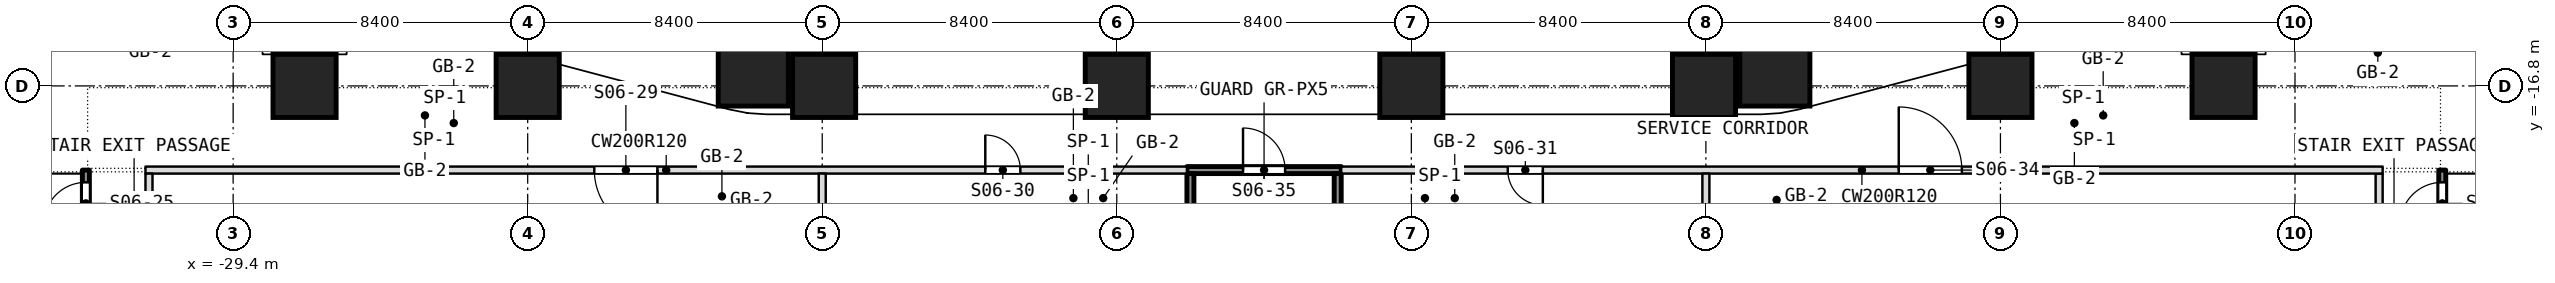
"""IFC4 building model, lengths in metres.
Left out: names, types, materials, properties, quantities, classifications, styles, units other than length and angle.
Written with IfcOpenShell. Run it as: python <this file> out.ifc"""

import sys

from ifc_helpers import new_model, si_unit, direction, frame, frame_2d, origin, origin_2d, place, context, subcontext, project, spatial, rectangle, extrude, element, fill, save


model = new_model("IFC4")
c1 = context("Model", 3, precision=1e-05, world=origin(), true_north=direction((0.0, 1.0)))
c2 = subcontext(c1, "Body", "Model", "MODEL_VIEW")
j1 = project(units=[si_unit("LENGTHUNIT", "METRE"), si_unit("PLANEANGLEUNIT", "RADIAN")], contexts=[c1])
p1 = place(None, origin())
s1 = spatial("IfcSite", under=j1, at=p1, CompositionType="ELEMENT")
p2 = place(p1, origin())
s2 = spatial("IfcBuilding", under=s1, at=p2, CompositionType="ELEMENT")
p3 = place(p2, frame((0.0, 0.0, 31.0)))
s3 = spatial("IfcBuildingStorey", under=s2, at=p3, CompositionType="ELEMENT", Elevation=31.0)
for number, where, z_axis, x_axis in (
    (1, (-21.0, -16.8, 0.0), (0.0, 0.0, 1.0), (1.0, 0.0, 0.0)),
    (2, (-12.546, -16.8, 0.0), (0.0, 0.0, 1.0), (1.0, 0.0, 0.0)),
    (3, (-4.2, -16.8, 0.0), (0.0, 0.0, 1.0), (1.0, 0.0, 0.0)),
    (4, (4.2, -16.8, 0.0), (0.0, 0.0, 1.0), (1.0, 0.0, 0.0)),
    (5, (12.546, -16.8, 0.0), (0.0, 0.0, 1.0), (1.0, 0.0, 0.0)),
    (6, (21.0, -16.8, 0.0), (0.0, 0.0, 1.0), (1.0, 0.0, 0.0)),
    (7, (-27.363, -16.8, 0.0), (0.0, 0.0, 1.0), (1.0, 0.0, 0.0)),
    (8, (27.363, -16.8, 0.0), (0.0, 0.0, 1.0), (1.0, 0.0, 0.0)),
):
    element("IfcColumn", number, at=place(p3, frame(where, z_axis=z_axis, x_axis=x_axis)), inside=s3, PredefinedType="COLUMN", context=c2, shape_type="SweptSolid", body=[
        extrude(rectangle(XDim=1.8, YDim=1.8, at=origin_2d()), origin(), (0.0, 0.0, 1.0), 5.5),
    ])
for number, where, z_axis, x_axis in (
    (9, (-14.566, -16.375, 0.0), (0.0, 0.0, 1.0), (1.0, 0.0, 0.0)),
    (10, (14.566, -16.375, 0.0), (0.0, 0.0, 1.0), (1.0, 0.0, 0.0)),
):
    element("IfcColumn", number, at=place(p3, frame(where, z_axis=z_axis, x_axis=x_axis)), inside=s3, PredefinedType="COLUMN", context=c2, shape_type="SweptSolid", body=[
        extrude(rectangle(XDim=2.0, YDim=2.0, at=origin_2d()), origin(), (0.0, 0.0, 1.0), 5.5),
    ])
p4 = place(p3, frame((33.6, -22.3, 0.0), z_axis=(0.0, 0.0, 1.0), x_axis=(0.0, 1.0, 0.0)))
e11 = element("IfcWall", 11, at=p4, inside=s3, PredefinedType="PARTITIONING", context=c2, shape_type="SweptSolid", body=[
    extrude(rectangle(XDim=3.1, YDim=0.2, at=frame_2d((1.55, 0.0))), origin(), (0.0, 0.0, 1.0), 5.35),
])
p5 = place(p4, frame((1.55, 0.0, 0.0)))
e12 = element("IfcOpeningElement", 12, at=p5, cuts=e11, PredefinedType="OPENING", context=c2, shape_type="SweptSolid", body=[
    extrude(rectangle(XDim=1.2, YDim=2.1, at=frame_2d((0.6, 1.05))), frame((0.0, 0.1, 0.0), z_axis=(0.0, -1.0, 0.0), x_axis=(1.0, 0.0, 0.0)), (0.0, 0.0, 1.0), 0.2),
])
p6 = place(p3, frame((31.8, -22.1, 0.0), z_axis=(0.0, 0.0, 1.0), x_axis=(0.0, 1.0, 0.0)))
e13 = element("IfcWall", 13, at=p6, inside=s3, PredefinedType="PARTITIONING", context=c2, shape_type="SweptSolid", body=[
    extrude(rectangle(XDim=2.8, YDim=0.2, at=frame_2d((1.4, 0.0))), origin(), (0.0, 0.0, 1.0), 5.35),
])
p7 = place(p3, frame((-31.9, -19.2, 0.0), z_axis=(0.0, 0.0, 1.0), x_axis=(1.0, 0.0, 0.0)))
e14 = element("IfcWall", 14, at=p7, inside=s3, PredefinedType="PARTITIONING", context=c2, shape_type="SweptSolid", body=[
    extrude(rectangle(XDim=29.7, YDim=0.2, at=frame_2d((14.85, 0.0))), origin(), (0.0, 0.0, 1.0), 3.7),
])
p8 = place(p7, frame((12.8, 0.0, 0.0)))
e15 = element("IfcOpeningElement", 15, at=p8, cuts=e14, PredefinedType="OPENING", context=c2, shape_type="SweptSolid", body=[
    extrude(rectangle(XDim=1.8, YDim=2.1, at=frame_2d((0.9, 1.05))), frame((0.0, 0.1, 0.0), z_axis=(0.0, -1.0, 0.0), x_axis=(1.0, 0.0, 0.0)), (0.0, 0.0, 1.0), 0.2),
])
p9 = place(p7, frame((23.95, 0.0, 0.0)))
e16 = element("IfcOpeningElement", 16, at=p9, cuts=e14, PredefinedType="OPENING", context=c2, shape_type="SweptSolid", body=[
    extrude(rectangle(XDim=1.0, YDim=2.1, at=frame_2d((0.5, 1.05))), frame((0.0, 0.1, 0.0), z_axis=(0.0, -1.0, 0.0), x_axis=(1.0, 0.0, 0.0)), (0.0, 0.0, 1.0), 0.2),
])
p10 = place(p3, frame((2.2, -19.2, 0.0), z_axis=(0.0, 0.0, 1.0), x_axis=(1.0, 0.0, 0.0)))
e17 = element("IfcWall", 17, at=p10, inside=s3, PredefinedType="PARTITIONING", context=c2, shape_type="SweptSolid", body=[
    extrude(rectangle(XDim=29.7, YDim=0.2, at=frame_2d((14.85, 0.0))), origin(), (0.0, 0.0, 1.0), 3.7),
])
p11 = place(p10, frame((4.75, 0.0, 0.0)))
e18 = element("IfcOpeningElement", 18, at=p11, cuts=e17, PredefinedType="OPENING", context=c2, shape_type="SweptSolid", body=[
    extrude(rectangle(XDim=1.0, YDim=2.1, at=frame_2d((0.5, 1.05))), frame((0.0, 0.1, 0.0), z_axis=(0.0, -1.0, 0.0), x_axis=(1.0, 0.0, 0.0)), (0.0, 0.0, 1.0), 0.2),
])
p12 = place(p10, frame((15.9, 0.0, 0.0)))
e19 = element("IfcOpeningElement", 19, at=p12, cuts=e17, PredefinedType="OPENING", context=c2, shape_type="SweptSolid", body=[
    extrude(rectangle(XDim=1.8, YDim=2.1, at=frame_2d((0.9, 1.05))), frame((0.0, 0.1, 0.0), z_axis=(0.0, -1.0, 0.0), x_axis=(1.0, 0.0, 0.0)), (0.0, 0.0, 1.0), 0.2),
])
p13 = place(p3, frame((-2.2, -19.2, 0.0), z_axis=(0.0, 0.0, 1.0), x_axis=(1.0, 0.0, 0.0)))
e20 = element("IfcWall", 20, at=p13, inside=s3, PredefinedType="PARTITIONING", context=c2, shape_type="SweptSolid", body=[
    extrude(rectangle(XDim=4.4, YDim=0.2, at=frame_2d((2.2, 0.0))), origin(), (0.0, 0.0, 1.0), 5.35),
])
p14 = place(p13, frame((1.6, 0.0, 0.0)))
e21 = element("IfcOpeningElement", 21, at=p14, cuts=e20, PredefinedType="OPENING", context=c2, shape_type="SweptSolid", body=[
    extrude(rectangle(XDim=1.2, YDim=2.1, at=frame_2d((0.6, 1.05))), frame((0.0, 0.1, 0.0), z_axis=(0.0, -1.0, 0.0), x_axis=(1.0, 0.0, 0.0)), (0.0, 0.0, 1.0), 0.2),
])
p15 = place(p3, frame((12.6, -25.5, 0.0), z_axis=(0.0, 0.0, 1.0), x_axis=(0.0, 1.0, 0.0)))
e22 = element("IfcWall", 22, at=p15, inside=s3, PredefinedType="PARTITIONING", context=c2, shape_type="SweptSolid", body=[
    extrude(rectangle(XDim=6.2, YDim=0.2, at=frame_2d((3.1, 0.0))), origin(), (0.0, 0.0, 1.0), 5.35),
])
for number, where, z_axis, x_axis in (
    (23, (2.1, -25.14, 0.0), (0.0, 0.0, 1.0), (0.0, 1.0, 0.0)),
    (24, (-2.1, -25.14, 0.0), (0.0, 0.0, 1.0), (0.0, 1.0, 0.0)),
):
    element("IfcWall", number, at=place(p3, frame(where, z_axis=z_axis, x_axis=x_axis)), inside=s3, PredefinedType="PARTITIONING", context=c2, shape_type="SweptSolid", body=[
        extrude(rectangle(XDim=5.84, YDim=0.2, at=frame_2d((2.92, 0.0))), origin(), (0.0, 0.0, 1.0), 5.35),
    ])
p16 = place(p3, frame((-12.6, -25.5, 0.0), z_axis=(0.0, 0.0, 1.0), x_axis=(0.0, 1.0, 0.0)))
e25 = element("IfcWall", 25, at=p16, inside=s3, PredefinedType="PARTITIONING", context=c2, shape_type="SweptSolid", body=[
    extrude(rectangle(XDim=6.2, YDim=0.2, at=frame_2d((3.1, 0.0))), origin(), (0.0, 0.0, 1.0), 5.35),
])
p17 = place(p3, frame((-31.8, -22.1, 0.0), z_axis=(0.0, 0.0, 1.0), x_axis=(0.0, 1.0, 0.0)))
e26 = element("IfcWall", 26, at=p17, inside=s3, PredefinedType="PARTITIONING", context=c2, shape_type="SweptSolid", body=[
    extrude(rectangle(XDim=2.8, YDim=0.2, at=frame_2d((1.4, 0.0))), origin(), (0.0, 0.0, 1.0), 5.35),
])
p18 = place(p3, frame((-33.6, -22.3, 0.0), z_axis=(0.0, 0.0, 1.0), x_axis=(0.0, 1.0, 0.0)))
e27 = element("IfcWall", 27, at=p18, inside=s3, PredefinedType="PARTITIONING", context=c2, shape_type="SweptSolid", body=[
    extrude(rectangle(XDim=3.1, YDim=0.2, at=frame_2d((1.55, 0.0))), origin(), (0.0, 0.0, 1.0), 5.35),
])
p19 = place(p18, frame((1.55, 0.0, 0.0)))
e28 = element("IfcOpeningElement", 28, at=p19, cuts=e27, PredefinedType="OPENING", context=c2, shape_type="SweptSolid", body=[
    extrude(rectangle(XDim=1.2, YDim=2.1, at=frame_2d((0.6, 1.05))), frame((0.0, 0.1, 0.0), z_axis=(0.0, -1.0, 0.0), x_axis=(1.0, 0.0, 0.0)), (0.0, 0.0, 1.0), 0.2),
])
p20 = place(p19, origin())
e29 = element("IfcDoor", 29, at=p20, inside=s3, OperationType="SINGLE_SWING_RIGHT", PredefinedType="DOOR", context=c2, shape_type="SweptSolid", body=[
    extrude(rectangle(XDim=1.2, YDim=2.1, at=frame_2d((0.6, 1.05))), frame((0.0, 0.025, 0.0), z_axis=(0.0, -1.0, 0.0), x_axis=(1.0, 0.0, 0.0)), (0.0, 0.0, 1.0), 0.05),
])
fill(e28, e29)
p21 = place(p5, origin())
e30 = element("IfcDoor", 30, at=p21, inside=s3, OperationType="SINGLE_SWING_LEFT", PredefinedType="DOOR", context=c2, shape_type="SweptSolid", body=[
    extrude(rectangle(XDim=1.2, YDim=2.1, at=frame_2d((0.6, 1.05))), frame((0.0, 0.025, 0.0), z_axis=(0.0, -1.0, 0.0), x_axis=(1.0, 0.0, 0.0)), (0.0, 0.0, 1.0), 0.05),
])
fill(e12, e30)
p22 = place(p8, origin())
e31 = element("IfcDoor", 31, at=p22, inside=s3, OperationType="DOUBLE_DOOR_SINGLE_SWING", PredefinedType="DOOR", context=c2, shape_type="SweptSolid", body=[
    extrude(rectangle(XDim=1.8, YDim=2.1, at=frame_2d((0.9, 1.05))), frame((0.0, 0.025, 0.0), z_axis=(0.0, -1.0, 0.0), x_axis=(1.0, 0.0, 0.0)), (0.0, 0.0, 1.0), 0.05),
])
fill(e15, e31)
p23 = place(p9, origin())
e32 = element("IfcDoor", 32, at=p23, inside=s3, OperationType="SINGLE_SWING_RIGHT", PredefinedType="DOOR", context=c2, shape_type="SweptSolid", body=[
    extrude(rectangle(XDim=1.0, YDim=2.1, at=frame_2d((0.5, 1.05))), frame((0.0, 0.025, 0.0), z_axis=(0.0, -1.0, 0.0), x_axis=(1.0, 0.0, 0.0)), (0.0, 0.0, 1.0), 0.05),
])
fill(e16, e32)
p24 = place(p11, origin())
e33 = element("IfcDoor", 33, at=p24, inside=s3, OperationType="SINGLE_SWING_LEFT", PredefinedType="DOOR", context=c2, shape_type="SweptSolid", body=[
    extrude(rectangle(XDim=1.0, YDim=2.1, at=frame_2d((0.5, 1.05))), frame((0.0, 0.025, 0.0), z_axis=(0.0, -1.0, 0.0), x_axis=(1.0, 0.0, 0.0)), (0.0, 0.0, 1.0), 0.05),
])
fill(e18, e33)
p25 = place(p12, origin())
e34 = element("IfcDoor", 34, at=p25, inside=s3, OperationType="DOUBLE_DOOR_SINGLE_SWING", PredefinedType="DOOR", context=c2, shape_type="SweptSolid", body=[
    extrude(rectangle(XDim=1.8, YDim=2.1, at=frame_2d((0.9, 1.05))), frame((0.0, 0.025, 0.0), z_axis=(0.0, -1.0, 0.0), x_axis=(1.0, 0.0, 0.0)), (0.0, 0.0, 1.0), 0.05),
])
fill(e19, e34)
p26 = place(p14, origin())
e35 = element("IfcDoor", 35, at=p26, inside=s3, OperationType="SINGLE_SWING_LEFT", PredefinedType="DOOR", context=c2, shape_type="SweptSolid", body=[
    extrude(rectangle(XDim=1.2, YDim=2.1, at=frame_2d((0.6, 1.05))), frame((0.0, 0.025, 0.0), z_axis=(0.0, -1.0, 0.0), x_axis=(1.0, 0.0, 0.0)), (0.0, 0.0, 1.0), 0.05),
])
fill(e21, e35)
save(model, sys.argv[1])
